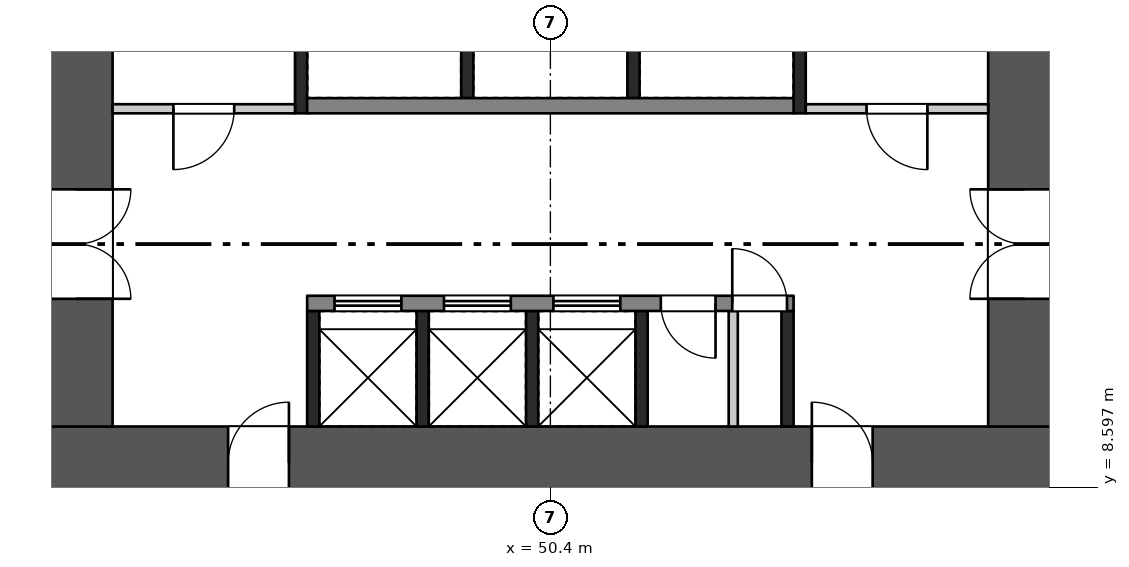
"""IFC4 building model, lengths in metres.
Left out: names, types, materials, properties, quantities, classifications, styles, units other than length and angle.
Written with IfcOpenShell. Run it as: python <this file> out.ifc"""

import sys

from ifc_helpers import new_model, si_unit, direction, frame, frame_2d, origin, place, context, subcontext, project, spatial, rectangle, extrude, element, fill, save


model = new_model("IFC4")
c1 = context("Model", 3, precision=1e-05, world=origin(), true_north=direction((0.0, 1.0)))
c2 = subcontext(c1, "Body", "Model", "MODEL_VIEW")
j1 = project(units=[si_unit("LENGTHUNIT", "METRE"), si_unit("PLANEANGLEUNIT", "RADIAN")], contexts=[c1])
p1 = place(None, origin())
s1 = spatial("IfcSite", under=j1, at=p1, CompositionType="ELEMENT")
p2 = place(p1, origin())
s2 = spatial("IfcBuilding", under=s1, at=p2, CompositionType="ELEMENT")
p3 = place(p2, frame((0.0, 0.0, 14.4)))
s3 = spatial("IfcBuildingStorey", under=s2, at=p3, CompositionType="ELEMENT", Elevation=14.4)
p4 = place(p3, frame((42.0, 9.0, 0.0), z_axis=(0.0, 0.0, 1.0), x_axis=(1.0, 0.0, 0.0)))
e1 = element("IfcWall", 1, at=p4, inside=s3, PredefinedType="SHEAR", context=c2, shape_type="SweptSolid", body=[
    extrude(rectangle(XDim=16.8, YDim=1.2, at=frame_2d((8.4, 0.0))), origin(), (0.0, 0.0, 1.0), 5.1),
])
p5 = place(p4, frame((3.1, 0.0, 0.0)))
e2 = element("IfcOpeningElement", 2, at=p5, cuts=e1, PredefinedType="OPENING", context=c2, shape_type="SweptSolid", body=[
    extrude(rectangle(XDim=1.0, YDim=2.1, at=frame_2d((0.5, 1.05))), frame((0.0, 0.61, 0.0), z_axis=(0.0, -1.0, 0.0), x_axis=(1.0, 0.0, 0.0)), (0.0, 0.0, 1.0), 1.22),
])
p6 = place(p4, frame((12.7, 0.0, 0.0)))
e3 = element("IfcOpeningElement", 3, at=p6, cuts=e1, PredefinedType="OPENING", context=c2, shape_type="SweptSolid", body=[
    extrude(rectangle(XDim=1.0, YDim=2.1, at=frame_2d((0.5, 1.05))), frame((0.0, 0.61, 0.0), z_axis=(0.0, -1.0, 0.0), x_axis=(1.0, 0.0, 0.0)), (0.0, 0.0, 1.0), 1.22),
])
p7 = place(p3, frame((42.6, 9.6, 0.0), z_axis=(0.0, 0.0, 1.0), x_axis=(0.0, 1.0, 0.0)))
e4 = element("IfcWall", 4, at=p7, inside=s3, PredefinedType="SHEAR", context=c2, shape_type="SweptSolid", body=[
    extrude(rectangle(XDim=14.4, YDim=1.2, at=frame_2d((7.2, 0.0))), origin(), (0.0, 0.0, 1.0), 5.1),
])
p8 = place(p7, frame((2.1, 0.0, 0.0)))
e5 = element("IfcOpeningElement", 5, at=p8, cuts=e4, PredefinedType="OPENING", context=c2, shape_type="SweptSolid", body=[
    extrude(rectangle(XDim=1.8, YDim=2.1, at=frame_2d((0.9, 1.05))), frame((0.0, 0.61, 0.0), z_axis=(0.0, -1.0, 0.0), x_axis=(1.0, 0.0, 0.0)), (0.0, 0.0, 1.0), 1.22),
])
p9 = place(p3, frame((58.2, 9.6, 0.0), z_axis=(0.0, 0.0, 1.0), x_axis=(0.0, 1.0, 0.0)))
e6 = element("IfcWall", 6, at=p9, inside=s3, PredefinedType="SHEAR", context=c2, shape_type="SweptSolid", body=[
    extrude(rectangle(XDim=14.4, YDim=1.2, at=frame_2d((7.2, 0.0))), origin(), (0.0, 0.0, 1.0), 5.1),
])
p10 = place(p9, frame((2.1, 0.0, 0.0)))
e7 = element("IfcOpeningElement", 7, at=p10, cuts=e6, PredefinedType="OPENING", context=c2, shape_type="SweptSolid", body=[
    extrude(rectangle(XDim=1.8, YDim=2.1, at=frame_2d((0.9, 1.05))), frame((0.0, 0.61, 0.0), z_axis=(0.0, -1.0, 0.0), x_axis=(1.0, 0.0, 0.0)), (0.0, 0.0, 1.0), 1.22),
])
for number, where, z_axis, x_axis in (
    (8, (46.5, 9.6, 0.0), (0.0, 0.0, 1.0), (0.0, 1.0, 0.0)),
    (9, (48.3, 9.6, 0.0), (0.0, 0.0, 1.0), (0.0, 1.0, 0.0)),
    (10, (50.1, 9.6, 0.0), (0.0, 0.0, 1.0), (0.0, 1.0, 0.0)),
    (11, (51.9, 9.6, 0.0), (0.0, 0.0, 1.0), (0.0, 1.0, 0.0)),
    (12, (54.3, 9.6, 0.0), (0.0, 0.0, 1.0), (0.0, 1.0, 0.0)),
):
    element("IfcWall", number, at=place(p3, frame(where, z_axis=z_axis, x_axis=x_axis)), inside=s3, PredefinedType="SHEAR", context=c2, shape_type="SweptSolid", body=[
        extrude(rectangle(XDim=1.9, YDim=0.2, at=frame_2d((0.95, 0.0))), origin(), (0.0, 0.0, 1.0), 5.1),
    ])
p11 = place(p3, frame((53.407, 9.6, 0.0), z_axis=(0.0, 0.0, 1.0), x_axis=(0.0, 1.0, 0.0)))
e13 = element("IfcWall", 13, at=p11, inside=s3, PredefinedType="PARTITIONING", context=c2, shape_type="SweptSolid", body=[
    extrude(rectangle(XDim=1.9, YDim=0.15, at=frame_2d((0.95, 0.0))), origin(), (0.0, 0.0, 1.0), 5.1),
])
p12 = place(p3, frame((46.4, 11.625, 0.0), z_axis=(0.0, 0.0, 1.0), x_axis=(1.0, 0.0, 0.0)))
e14 = element("IfcWall", 14, at=p12, inside=s3, PredefinedType="SHEAR", context=c2, shape_type="SweptSolid", body=[
    extrude(rectangle(XDim=8.0, YDim=0.25, at=frame_2d((4.0, 0.0))), origin(), (0.0, 0.0, 1.0), 5.1),
])
p13 = place(p12, frame((0.45, 0.0, 0.0)))
e15 = element("IfcOpeningElement", 15, at=p13, cuts=e14, PredefinedType="OPENING", context=c2, shape_type="SweptSolid", body=[
    extrude(rectangle(XDim=1.1, YDim=2.1, at=frame_2d((0.55, 1.05))), frame((0.0, 0.135, 0.0), z_axis=(0.0, -1.0, 0.0), x_axis=(1.0, 0.0, 0.0)), (0.0, 0.0, 1.0), 0.27),
])
p14 = place(p12, frame((2.25, 0.0, 0.0)))
e16 = element("IfcOpeningElement", 16, at=p14, cuts=e14, PredefinedType="OPENING", context=c2, shape_type="SweptSolid", body=[
    extrude(rectangle(XDim=1.1, YDim=2.1, at=frame_2d((0.55, 1.05))), frame((0.0, 0.135, 0.0), z_axis=(0.0, -1.0, 0.0), x_axis=(1.0, 0.0, 0.0)), (0.0, 0.0, 1.0), 0.27),
])
p15 = place(p12, frame((4.05, 0.0, 0.0)))
e17 = element("IfcOpeningElement", 17, at=p15, cuts=e14, PredefinedType="OPENING", context=c2, shape_type="SweptSolid", body=[
    extrude(rectangle(XDim=1.1, YDim=2.1, at=frame_2d((0.55, 1.05))), frame((0.0, 0.135, 0.0), z_axis=(0.0, -1.0, 0.0), x_axis=(1.0, 0.0, 0.0)), (0.0, 0.0, 1.0), 0.27),
])
p16 = place(p12, frame((5.816, 0.0, 0.0)))
e18 = element("IfcOpeningElement", 18, at=p16, cuts=e14, PredefinedType="OPENING", context=c2, shape_type="SweptSolid", body=[
    extrude(rectangle(XDim=0.9, YDim=2.1, at=frame_2d((0.45, 1.05))), frame((0.0, 0.135, 0.0), z_axis=(0.0, -1.0, 0.0), x_axis=(1.0, 0.0, 0.0)), (0.0, 0.0, 1.0), 0.27),
])
p17 = place(p12, frame((6.991, 0.0, 0.0)))
e19 = element("IfcOpeningElement", 19, at=p17, cuts=e14, PredefinedType="OPENING", context=c2, shape_type="SweptSolid", body=[
    extrude(rectangle(XDim=0.9, YDim=2.1, at=frame_2d((0.45, 1.05))), frame((0.0, 0.135, 0.0), z_axis=(0.0, -1.0, 0.0), x_axis=(1.0, 0.0, 0.0)), (0.0, 0.0, 1.0), 0.27),
])
for number, where, z_axis, x_axis in (
    (20, (49.033, 15.0, 0.0), (0.0, 0.0, 1.0), (0.0, 1.0, 0.0)),
    (21, (51.767, 15.0, 0.0), (0.0, 0.0, 1.0), (0.0, 1.0, 0.0)),
):
    element("IfcWall", number, at=place(p3, frame(where, z_axis=z_axis, x_axis=x_axis)), inside=s3, PredefinedType="SHEAR", context=c2, shape_type="SweptSolid", body=[
        extrude(rectangle(XDim=1.9, YDim=0.2, at=frame_2d((0.95, 0.0))), origin(), (0.0, 0.0, 1.0), 5.1),
    ])
p18 = place(p3, frame((46.4, 14.875, 0.0), z_axis=(0.0, 0.0, 1.0), x_axis=(1.0, 0.0, 0.0)))
e22 = element("IfcWall", 22, at=p18, inside=s3, PredefinedType="SHEAR", context=c2, shape_type="SweptSolid", body=[
    extrude(rectangle(XDim=8.0, YDim=0.25, at=frame_2d((4.0, 0.0))), origin(), (0.0, 0.0, 1.0), 5.1),
])
p19 = place(p3, frame((46.3, 14.75, 0.0), z_axis=(0.0, 0.0, 1.0), x_axis=(0.0, 1.0, 0.0)))
e23 = element("IfcWall", 23, at=p19, inside=s3, PredefinedType="SHEAR", context=c2, shape_type="SweptSolid", body=[
    extrude(rectangle(XDim=2.4, YDim=0.2, at=frame_2d((1.2, 0.0))), origin(), (0.0, 0.0, 1.0), 5.1),
])
p20 = place(p3, frame((43.2, 14.825, 0.0), z_axis=(0.0, 0.0, 1.0), x_axis=(1.0, 0.0, 0.0)))
e24 = element("IfcWall", 24, at=p20, inside=s3, PredefinedType="PARTITIONING", context=c2, shape_type="SweptSolid", body=[
    extrude(rectangle(XDim=3.0, YDim=0.15, at=frame_2d((1.5, 0.0))), origin(), (0.0, 0.0, 1.0), 5.1),
])
p21 = place(p20, frame((1.0, 0.0, 0.0)))
e25 = element("IfcOpeningElement", 25, at=p21, cuts=e24, PredefinedType="OPENING", context=c2, shape_type="SweptSolid", body=[
    extrude(rectangle(XDim=1.0, YDim=2.1, at=frame_2d((0.5, 1.05))), frame((0.0, 0.085, 0.0), z_axis=(0.0, -1.0, 0.0), x_axis=(1.0, 0.0, 0.0)), (0.0, 0.0, 1.0), 0.17),
])
p22 = place(p3, frame((54.5, 14.75, 0.0), z_axis=(0.0, 0.0, 1.0), x_axis=(0.0, 1.0, 0.0)))
e26 = element("IfcWall", 26, at=p22, inside=s3, PredefinedType="SHEAR", context=c2, shape_type="SweptSolid", body=[
    extrude(rectangle(XDim=2.4, YDim=0.2, at=frame_2d((1.2, 0.0))), origin(), (0.0, 0.0, 1.0), 5.1),
])
p23 = place(p3, frame((54.6, 14.825, 0.0), z_axis=(0.0, 0.0, 1.0), x_axis=(1.0, 0.0, 0.0)))
e27 = element("IfcWall", 27, at=p23, inside=s3, PredefinedType="PARTITIONING", context=c2, shape_type="SweptSolid", body=[
    extrude(rectangle(XDim=3.0, YDim=0.15, at=frame_2d((1.5, 0.0))), origin(), (0.0, 0.0, 1.0), 5.1),
])
p24 = place(p23, frame((1.0, 0.0, 0.0)))
e28 = element("IfcOpeningElement", 28, at=p24, cuts=e27, PredefinedType="OPENING", context=c2, shape_type="SweptSolid", body=[
    extrude(rectangle(XDim=1.0, YDim=2.1, at=frame_2d((0.5, 1.05))), frame((0.0, 0.085, 0.0), z_axis=(0.0, -1.0, 0.0), x_axis=(1.0, 0.0, 0.0)), (0.0, 0.0, 1.0), 0.17),
])
p25 = place(p5, origin())
e29 = element("IfcDoor", 29, at=p25, inside=s3, OperationType="SINGLE_SWING_RIGHT", PredefinedType="DOOR", context=c2, shape_type="SweptSolid", body=[
    extrude(rectangle(XDim=1.0, YDim=2.1, at=frame_2d((0.5, 1.05))), frame((0.0, 0.025, 0.0), z_axis=(0.0, -1.0, 0.0), x_axis=(1.0, 0.0, 0.0)), (0.0, 0.0, 1.0), 0.05),
])
fill(e2, e29)
p26 = place(p6, origin())
e30 = element("IfcDoor", 30, at=p26, inside=s3, OperationType="SINGLE_SWING_LEFT", PredefinedType="DOOR", context=c2, shape_type="SweptSolid", body=[
    extrude(rectangle(XDim=1.0, YDim=2.1, at=frame_2d((0.5, 1.05))), frame((0.0, 0.025, 0.0), z_axis=(0.0, -1.0, 0.0), x_axis=(1.0, 0.0, 0.0)), (0.0, 0.0, 1.0), 0.05),
])
fill(e3, e30)
p27 = place(p8, frame((1.8, 0.0, 0.0), z_axis=(0.0, 0.0, 1.0), x_axis=(-1.0, 0.0, 0.0)))
e31 = element("IfcDoor", 31, at=p27, inside=s3, OperationType="DOUBLE_DOOR_SINGLE_SWING", PredefinedType="DOOR", context=c2, shape_type="SweptSolid", body=[
    extrude(rectangle(XDim=1.8, YDim=2.1, at=frame_2d((0.9, 1.05))), frame((0.0, 0.025, 0.0), z_axis=(0.0, -1.0, 0.0), x_axis=(1.0, 0.0, 0.0)), (0.0, 0.0, 1.0), 0.05),
])
fill(e5, e31)
p28 = place(p10, origin())
e32 = element("IfcDoor", 32, at=p28, inside=s3, OperationType="DOUBLE_DOOR_SINGLE_SWING", PredefinedType="DOOR", context=c2, shape_type="SweptSolid", body=[
    extrude(rectangle(XDim=1.8, YDim=2.1, at=frame_2d((0.9, 1.05))), frame((0.0, 0.025, 0.0), z_axis=(0.0, -1.0, 0.0), x_axis=(1.0, 0.0, 0.0)), (0.0, 0.0, 1.0), 0.05),
])
fill(e7, e32)
p29 = place(p13, origin())
e33 = element("IfcDoor", 33, at=p29, inside=s3, OperationType="DOUBLE_DOOR_SLIDING", PredefinedType="DOOR", context=c2, shape_type="SweptSolid", body=[
    extrude(rectangle(XDim=1.1, YDim=2.1, at=frame_2d((0.55, 1.05))), frame((0.0, 0.025, 0.0), z_axis=(0.0, -1.0, 0.0), x_axis=(1.0, 0.0, 0.0)), (0.0, 0.0, 1.0), 0.05),
])
fill(e15, e33)
p30 = place(p14, origin())
e34 = element("IfcDoor", 34, at=p30, inside=s3, OperationType="DOUBLE_DOOR_SLIDING", PredefinedType="DOOR", context=c2, shape_type="SweptSolid", body=[
    extrude(rectangle(XDim=1.1, YDim=2.1, at=frame_2d((0.55, 1.05))), frame((0.0, 0.025, 0.0), z_axis=(0.0, -1.0, 0.0), x_axis=(1.0, 0.0, 0.0)), (0.0, 0.0, 1.0), 0.05),
])
fill(e16, e34)
p31 = place(p15, origin())
e35 = element("IfcDoor", 35, at=p31, inside=s3, OperationType="DOUBLE_DOOR_SLIDING", PredefinedType="DOOR", context=c2, shape_type="SweptSolid", body=[
    extrude(rectangle(XDim=1.1, YDim=2.1, at=frame_2d((0.55, 1.05))), frame((0.0, 0.025, 0.0), z_axis=(0.0, -1.0, 0.0), x_axis=(1.0, 0.0, 0.0)), (0.0, 0.0, 1.0), 0.05),
])
fill(e17, e35)
p32 = place(p16, frame((0.9, 0.0, 0.0), z_axis=(0.0, 0.0, 1.0), x_axis=(-1.0, 0.0, 0.0)))
e36 = element("IfcDoor", 36, at=p32, inside=s3, OperationType="SINGLE_SWING_LEFT", PredefinedType="DOOR", context=c2, shape_type="SweptSolid", body=[
    extrude(rectangle(XDim=0.9, YDim=2.1, at=frame_2d((0.45, 1.05))), frame((0.0, 0.025, 0.0), z_axis=(0.0, -1.0, 0.0), x_axis=(1.0, 0.0, 0.0)), (0.0, 0.0, 1.0), 0.05),
])
fill(e18, e36)
p33 = place(p17, origin())
e37 = element("IfcDoor", 37, at=p33, inside=s3, OperationType="SINGLE_SWING_LEFT", PredefinedType="DOOR", context=c2, shape_type="SweptSolid", body=[
    extrude(rectangle(XDim=0.9, YDim=2.1, at=frame_2d((0.45, 1.05))), frame((0.0, 0.025, 0.0), z_axis=(0.0, -1.0, 0.0), x_axis=(1.0, 0.0, 0.0)), (0.0, 0.0, 1.0), 0.05),
])
fill(e19, e37)
p34 = place(p21, frame((1.0, 0.0, 0.0), z_axis=(0.0, 0.0, 1.0), x_axis=(-1.0, 0.0, 0.0)))
e38 = element("IfcDoor", 38, at=p34, inside=s3, OperationType="SINGLE_SWING_RIGHT", PredefinedType="DOOR", context=c2, shape_type="SweptSolid", body=[
    extrude(rectangle(XDim=1.0, YDim=2.1, at=frame_2d((0.5, 1.05))), frame((0.0, 0.025, 0.0), z_axis=(0.0, -1.0, 0.0), x_axis=(1.0, 0.0, 0.0)), (0.0, 0.0, 1.0), 0.05),
])
fill(e25, e38)
p35 = place(p24, frame((1.0, 0.0, 0.0), z_axis=(0.0, 0.0, 1.0), x_axis=(-1.0, 0.0, 0.0)))
e39 = element("IfcDoor", 39, at=p35, inside=s3, OperationType="SINGLE_SWING_LEFT", PredefinedType="DOOR", context=c2, shape_type="SweptSolid", body=[
    extrude(rectangle(XDim=1.0, YDim=2.1, at=frame_2d((0.5, 1.05))), frame((0.0, 0.025, 0.0), z_axis=(0.0, -1.0, 0.0), x_axis=(1.0, 0.0, 0.0)), (0.0, 0.0, 1.0), 0.05),
])
fill(e28, e39)
save(model, sys.argv[1])
